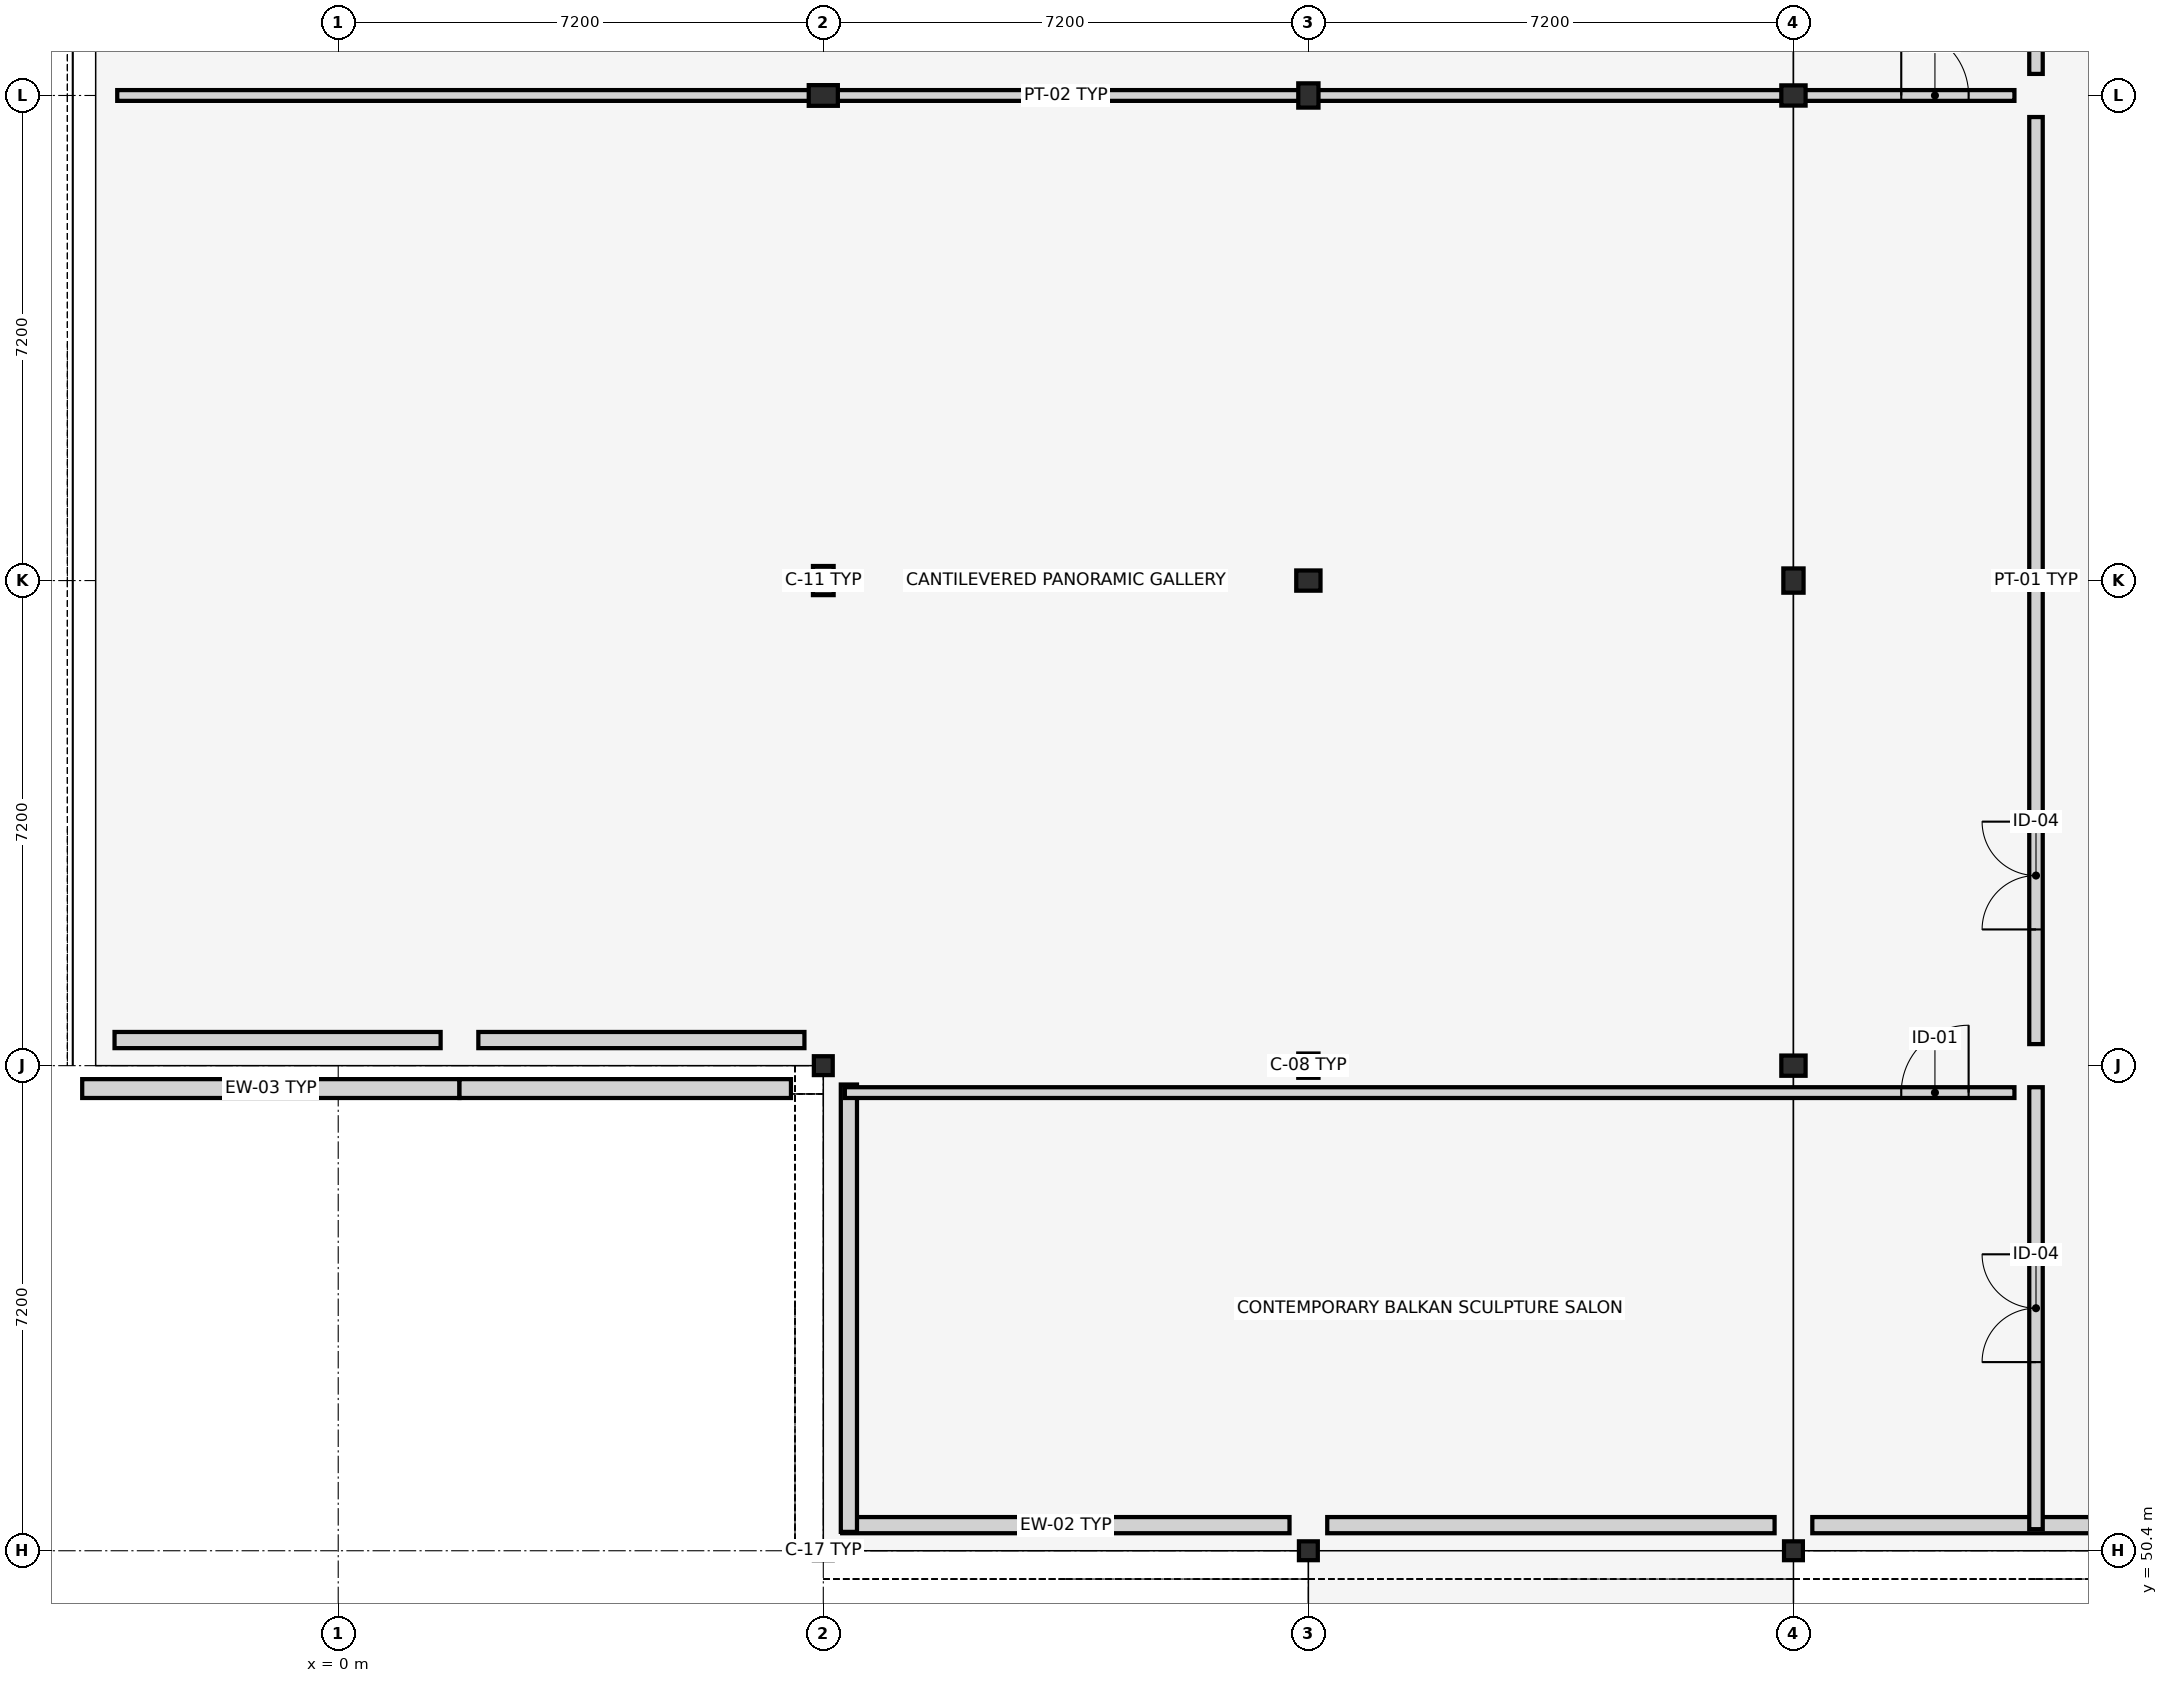
"""IFC4 building model, lengths in metres.
Left out: names, types, materials, properties, quantities, classifications, styles, units other than length and angle.
Written with IfcOpenShell. Run it as: python <this file> out.ifc"""

import sys

from ifc_helpers import new_model, si_unit, direction, frame, frame_2d, origin, origin_2d, place, context, subcontext, project, spatial, rectangle, i_section, extrude, element, fill, save


model = new_model("IFC4")
c1 = context("Model", 3, precision=1e-05, world=origin(), true_north=direction((0.0, 1.0)))
c2 = subcontext(c1, "Body", "Model", "MODEL_VIEW")
j1 = project(units=[si_unit("LENGTHUNIT", "METRE"), si_unit("PLANEANGLEUNIT", "RADIAN")], contexts=[c1])
p1 = place(None, origin())
s1 = spatial("IfcSite", under=j1, at=p1, CompositionType="ELEMENT")
p2 = place(p1, origin())
s2 = spatial("IfcBuilding", under=s1, at=p2, CompositionType="ELEMENT")
p3 = place(p2, frame((0.0, 0.0, 12.9)))
s3 = spatial("IfcBuildingStorey", under=s2, at=p3, CompositionType="ELEMENT", Elevation=12.9)
for number, where, z_axis, x_axis in (
    (1, (7.2, 50.4, 0.0), (0.0, 0.0, 1.0), (1.0, 0.0, 0.0)),
    (2, (7.2, 57.6, 0.0), (0.0, 0.0, 1.0), (0.0, 1.0, 0.0)),
):
    element("IfcColumn", number, at=place(p3, frame(where, z_axis=z_axis, x_axis=x_axis)), inside=s3, PredefinedType="COLUMN", context=c2, shape_type="SweptSolid", body=[
        extrude(i_section(OverallWidth=0.28, OverallDepth=0.28, WebThickness=0.01, FlangeThickness=0.018, FilletRadius=0.024, at=origin_2d()), origin(), (0.0, 0.0, 1.0), 4.2),
    ])
for number, where, z_axis, x_axis in (
    (3, (7.2, 64.8, 0.0), (0.0, 0.0, 1.0), (1.0, 0.0, 0.0)),
    (4, (7.2, 72.0, 0.0), (0.0, 0.0, 1.0), (0.0, 1.0, 0.0)),
):
    element("IfcColumn", number, at=place(p3, frame(where, z_axis=z_axis, x_axis=x_axis)), inside=s3, PredefinedType="COLUMN", context=c2, shape_type="SweptSolid", body=[
        extrude(i_section(OverallWidth=0.307, OverallDepth=0.432, WebThickness=0.021, FlangeThickness=0.04, FilletRadius=0.027, at=origin_2d()), origin(), (0.0, 0.0, 1.0), 4.2),
    ])
p4 = place(p3, frame((14.4, 50.4, 0.0), z_axis=(0.0, 0.0, 1.0), x_axis=(0.0, 1.0, 0.0)))
e5 = element("IfcColumn", 5, at=p4, inside=s3, PredefinedType="COLUMN", context=c2, shape_type="SweptSolid", body=[
    extrude(i_section(OverallWidth=0.28, OverallDepth=0.28, WebThickness=0.01, FlangeThickness=0.018, FilletRadius=0.024, at=origin_2d()), origin(), (0.0, 0.0, 1.0), 4.2),
])
for number, where, z_axis, x_axis in (
    (6, (14.4, 57.6, 0.0), (0.0, 0.0, 1.0), (1.0, 0.0, 0.0)),
    (7, (14.4, 64.8, 0.0), (0.0, 0.0, 1.0), (0.0, 1.0, 0.0)),
    (8, (14.4, 72.0, 0.0), (0.0, 0.0, 1.0), (1.0, 0.0, 0.0)),
):
    element("IfcColumn", number, at=place(p3, frame(where, z_axis=z_axis, x_axis=x_axis)), inside=s3, PredefinedType="COLUMN", context=c2, shape_type="SweptSolid", body=[
        extrude(i_section(OverallWidth=0.3, OverallDepth=0.36, WebThickness=0.012, FlangeThickness=0.022, FilletRadius=0.027, at=origin_2d()), origin(), (0.0, 0.0, 1.0), 4.2),
    ])
p5 = place(p3, frame((21.6, 50.4, 0.0), z_axis=(0.0, 0.0, 1.0), x_axis=(1.0, 0.0, 0.0)))
e9 = element("IfcColumn", 9, at=p5, inside=s3, PredefinedType="COLUMN", context=c2, shape_type="SweptSolid", body=[
    extrude(i_section(OverallWidth=0.28, OverallDepth=0.28, WebThickness=0.01, FlangeThickness=0.018, FilletRadius=0.024, at=origin_2d()), origin(), (0.0, 0.0, 1.0), 4.2),
])
for number, where, z_axis, x_axis in (
    (10, (21.6, 57.6, 0.0), (0.0, 0.0, 1.0), (0.0, 1.0, 0.0)),
    (11, (21.6, 64.8, 0.0), (0.0, 0.0, 1.0), (1.0, 0.0, 0.0)),
    (12, (21.6, 72.0, 0.0), (0.0, 0.0, 1.0), (0.0, 1.0, 0.0)),
):
    element("IfcColumn", number, at=place(p3, frame(where, z_axis=z_axis, x_axis=x_axis)), inside=s3, PredefinedType="COLUMN", context=c2, shape_type="SweptSolid", body=[
        extrude(i_section(OverallWidth=0.3, OverallDepth=0.36, WebThickness=0.012, FlangeThickness=0.022, FilletRadius=0.027, at=origin_2d()), origin(), (0.0, 0.0, 1.0), 4.2),
    ])
for number, where, z_axis, x_axis in (
    (13, (7.48, 50.78, 0.0), (0.0, 0.0, 1.0), (1.0, 0.0, 0.0)),
    (14, (14.68, 50.78, 0.0), (0.0, 0.0, 1.0), (1.0, 0.0, 0.0)),
    (15, (21.88, 50.78, 0.0), (0.0, 0.0, 1.0), (1.0, 0.0, 0.0)),
):
    element("IfcWall", number, at=place(p3, frame(where, z_axis=z_axis, x_axis=x_axis)), inside=s3, PredefinedType="STANDARD", context=c2, shape_type="SweptSolid", body=[
        extrude(rectangle(XDim=6.64, YDim=0.24, at=frame_2d((3.32, 0.0))), origin(), (0.0, 0.0, 1.0), 3.58),
    ])
p6 = place(p3, frame((-3.8, 57.26, 0.0), z_axis=(0.0, 0.0, 1.0), x_axis=(1.0, 0.0, 0.0)))
e16 = element("IfcWall", 16, at=p6, inside=s3, PredefinedType="STANDARD", context=c2, shape_type="SweptSolid", body=[
    extrude(rectangle(XDim=5.6, YDim=0.28, at=frame_2d((2.8, 0.0))), origin(), (0.0, 0.0, 1.0), 4.2),
])
p7 = place(p3, frame((-3.32, 57.98, 0.0), z_axis=(0.0, 0.0, 1.0), x_axis=(1.0, 0.0, 0.0)))
e17 = element("IfcWall", 17, at=p7, inside=s3, PredefinedType="STANDARD", context=c2, shape_type="SweptSolid", body=[
    extrude(rectangle(XDim=4.84, YDim=0.24, at=frame_2d((2.42, 0.0))), origin(), (0.0, 0.0, 1.0), 3.58),
])
p8 = place(p3, frame((1.8, 57.26, 0.0), z_axis=(0.0, 0.0, 1.0), x_axis=(1.0, 0.0, 0.0)))
e18 = element("IfcWall", 18, at=p8, inside=s3, PredefinedType="STANDARD", context=c2, shape_type="SweptSolid", body=[
    extrude(rectangle(XDim=4.92, YDim=0.28, at=frame_2d((2.46, 0.0))), origin(), (0.0, 0.0, 1.0), 4.2),
])
p9 = place(p3, frame((2.08, 57.98, 0.0), z_axis=(0.0, 0.0, 1.0), x_axis=(1.0, 0.0, 0.0)))
e19 = element("IfcWall", 19, at=p9, inside=s3, PredefinedType="STANDARD", context=c2, shape_type="SweptSolid", body=[
    extrude(rectangle(XDim=4.84, YDim=0.24, at=frame_2d((2.42, 0.0))), origin(), (0.0, 0.0, 1.0), 3.58),
])
p10 = place(p3, frame((7.58, 57.32, 0.0), z_axis=(0.0, 0.0, 1.0), x_axis=(0.0, -1.0, 0.0)))
e20 = element("IfcWall", 20, at=p10, inside=s3, PredefinedType="STANDARD", context=c2, shape_type="SweptSolid", body=[
    extrude(rectangle(XDim=6.64, YDim=0.24, at=frame_2d((3.32, 0.0))), origin(), (0.0, 0.0, 1.0), 3.58),
])
p11 = place(p3, frame((25.2, 57.92, 0.0), z_axis=(0.0, 0.0, 1.0), x_axis=(0.0, 1.0, 0.0)))
e21 = element("IfcWall", 21, at=p11, inside=s3, PredefinedType="PARTITIONING", context=c2, shape_type="SweptSolid", body=[
    extrude(rectangle(XDim=13.76, YDim=0.2, at=frame_2d((6.88, 0.0))), origin(), (0.0, 0.0, 1.0), 3.15),
])
p12 = place(p11, frame((1.702, 0.0, 0.0)))
e22 = element("IfcOpeningElement", 22, at=p12, cuts=e21, PredefinedType="OPENING", context=c2, shape_type="SweptSolid", body=[
    extrude(rectangle(XDim=1.6, YDim=2.35, at=frame_2d((0.8, 1.175))), frame((0.0, 0.11, 0.0), z_axis=(0.0, -1.0, 0.0), x_axis=(1.0, 0.0, 0.0)), (0.0, 0.0, 1.0), 0.22),
])
p13 = place(p3, frame((25.2, 72.32, 0.0), z_axis=(0.0, 0.0, 1.0), x_axis=(0.0, 1.0, 0.0)))
e23 = element("IfcWall", 23, at=p13, inside=s3, PredefinedType="PARTITIONING", context=c2, shape_type="SweptSolid", body=[
    extrude(rectangle(XDim=20.96, YDim=0.2, at=frame_2d((10.48, 0.0))), origin(), (0.0, 0.0, 1.0), 3.15),
])
p14 = place(p13, frame((9.73, 0.0, 0.0)))
e24 = element("IfcOpeningElement", 24, at=p14, cuts=e23, PredefinedType="OPENING", context=c2, shape_type="SweptSolid", body=[
    extrude(rectangle(XDim=1.5, YDim=2.25, at=frame_2d((0.75, 1.125))), frame((0.0, 0.11, 0.0), z_axis=(0.0, -1.0, 0.0), x_axis=(1.0, 0.0, 0.0)), (0.0, 0.0, 1.0), 0.22),
])
p15 = place(p3, frame((25.2, 50.72, 0.0), z_axis=(0.0, 0.0, 1.0), x_axis=(0.0, 1.0, 0.0)))
e25 = element("IfcWall", 25, at=p15, inside=s3, PredefinedType="PARTITIONING", context=c2, shape_type="SweptSolid", body=[
    extrude(rectangle(XDim=6.56, YDim=0.2, at=frame_2d((3.28, 0.0))), origin(), (0.0, 0.0, 1.0), 3.15),
])
p16 = place(p15, frame((2.48, 0.0, 0.0)))
e26 = element("IfcOpeningElement", 26, at=p16, cuts=e25, PredefinedType="OPENING", context=c2, shape_type="SweptSolid", body=[
    extrude(rectangle(XDim=1.6, YDim=2.35, at=frame_2d((0.8, 1.175))), frame((0.0, 0.11, 0.0), z_axis=(0.0, -1.0, 0.0), x_axis=(1.0, 0.0, 0.0)), (0.0, 0.0, 1.0), 0.22),
])
p17 = place(p3, frame((-3.28, 72.0, 0.0), z_axis=(0.0, 0.0, 1.0), x_axis=(1.0, 0.0, 0.0)))
e27 = element("IfcWall", 27, at=p17, inside=s3, PredefinedType="PARTITIONING", context=c2, shape_type="SweptSolid", body=[
    extrude(rectangle(XDim=28.16, YDim=0.16, at=frame_2d((14.08, 0.0))), origin(), (0.0, 0.0, 1.0), 3.15),
])
p18 = place(p17, frame((26.48, 0.0, 0.0)))
e28 = element("IfcOpeningElement", 28, at=p18, cuts=e27, PredefinedType="OPENING", context=c2, shape_type="SweptSolid", body=[
    extrude(rectangle(XDim=1.0, YDim=2.15, at=frame_2d((0.5, 1.075))), frame((0.0, 0.09, 0.0), z_axis=(0.0, -1.0, 0.0), x_axis=(1.0, 0.0, 0.0)), (0.0, 0.0, 1.0), 0.18),
])
p19 = place(p3, frame((7.52, 57.2, 0.0), z_axis=(0.0, 0.0, 1.0), x_axis=(1.0, 0.0, 0.0)))
e29 = element("IfcWall", 29, at=p19, inside=s3, PredefinedType="PARTITIONING", context=c2, shape_type="SweptSolid", body=[
    extrude(rectangle(XDim=17.36, YDim=0.16, at=frame_2d((8.68, 0.0))), origin(), (0.0, 0.0, 1.0), 3.15),
])
p20 = place(p19, frame((15.68, 0.0, 0.0)))
e30 = element("IfcOpeningElement", 30, at=p20, cuts=e29, PredefinedType="OPENING", context=c2, shape_type="SweptSolid", body=[
    extrude(rectangle(XDim=1.0, YDim=2.15, at=frame_2d((0.5, 1.075))), frame((0.0, 0.09, 0.0), z_axis=(0.0, -1.0, 0.0), x_axis=(1.0, 0.0, 0.0)), (0.0, 0.0, 1.0), 0.18),
])
p21 = place(p12, origin())
e31 = element("IfcDoor", 31, at=p21, inside=s3, OperationType="DOUBLE_DOOR_SINGLE_SWING", PredefinedType="DOOR", context=c2, shape_type="SweptSolid", body=[
    extrude(rectangle(XDim=1.6, YDim=2.35, at=frame_2d((0.8, 1.175))), frame((0.0, 0.025, 0.0), z_axis=(0.0, -1.0, 0.0), x_axis=(1.0, 0.0, 0.0)), (0.0, 0.0, 1.0), 0.05),
])
fill(e22, e31)
p22 = place(p16, origin())
e32 = element("IfcDoor", 32, at=p22, inside=s3, OperationType="DOUBLE_DOOR_SINGLE_SWING", PredefinedType="DOOR", context=c2, shape_type="SweptSolid", body=[
    extrude(rectangle(XDim=1.6, YDim=2.35, at=frame_2d((0.8, 1.175))), frame((0.0, 0.025, 0.0), z_axis=(0.0, -1.0, 0.0), x_axis=(1.0, 0.0, 0.0)), (0.0, 0.0, 1.0), 0.05),
])
fill(e26, e32)
p23 = place(p18, origin())
e33 = element("IfcDoor", 33, at=p23, inside=s3, OperationType="SINGLE_SWING_LEFT", PredefinedType="DOOR", context=c2, shape_type="SweptSolid", body=[
    extrude(rectangle(XDim=1.0, YDim=2.15, at=frame_2d((0.5, 1.075))), frame((0.0, 0.025, 0.0), z_axis=(0.0, -1.0, 0.0), x_axis=(1.0, 0.0, 0.0)), (0.0, 0.0, 1.0), 0.05),
])
fill(e28, e33)
p24 = place(p20, origin())
e34 = element("IfcDoor", 34, at=p24, inside=s3, OperationType="SINGLE_SWING_RIGHT", PredefinedType="DOOR", context=c2, shape_type="SweptSolid", body=[
    extrude(rectangle(XDim=1.0, YDim=2.15, at=frame_2d((0.5, 1.075))), frame((0.0, 0.025, 0.0), z_axis=(0.0, -1.0, 0.0), x_axis=(1.0, 0.0, 0.0)), (0.0, 0.0, 1.0), 0.05),
])
fill(e30, e34)
save(model, sys.argv[1])
